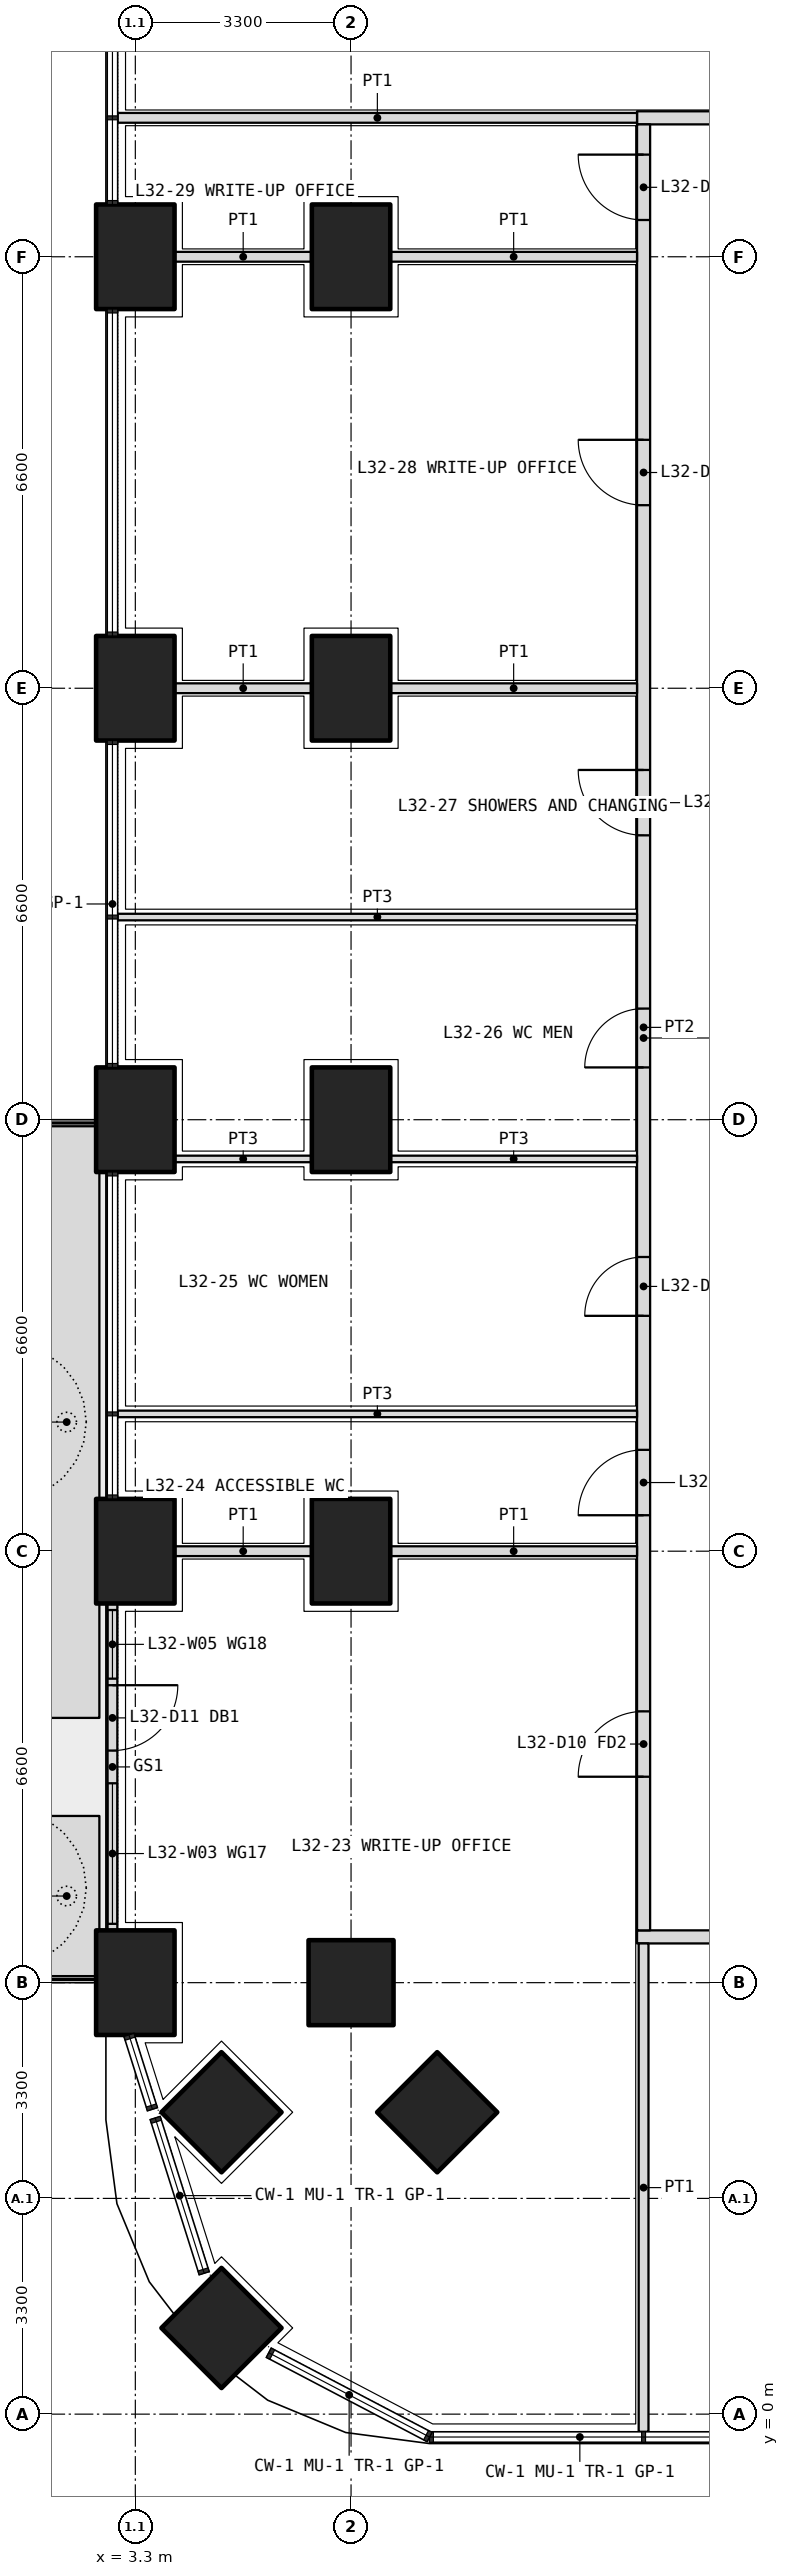
"""IFC4 building model, lengths in metres.
Left out: names, types, materials, properties, quantities, classifications, styles, units other than length and angle.
Written with IfcOpenShell. Run it as: python <this file> out.ifc"""

import sys

from ifc_helpers import new_model, si_unit, direction, frame, frame_2d, origin, origin_2d, place, context, subcontext, project, spatial, polyline, rectangle, outline, extrude, element, fill, save


model = new_model("IFC4")
c1 = context("Model", 3, precision=1e-05, world=origin(), true_north=direction((0.0, 1.0)))
c2 = subcontext(c1, "Body", "Model", "MODEL_VIEW")
j1 = project(units=[si_unit("LENGTHUNIT", "METRE"), si_unit("PLANEANGLEUNIT", "RADIAN")], contexts=[c1])
p1 = place(None, origin())
s1 = spatial("IfcSite", under=j1, at=p1, CompositionType="ELEMENT")
p2 = place(p1, origin())
s2 = spatial("IfcBuilding", under=s1, at=p2, CompositionType="ELEMENT")
p3 = place(p2, frame((0.0, 0.0, 141.0)))
s3 = spatial("IfcBuildingStorey", under=s2, at=p3, CompositionType="ELEMENT", Elevation=141.0)
p4 = place(p3, frame((4.618, 1.318, 0.0), z_axis=(0.0, 0.0, 1.0), x_axis=(0.707106781187, 0.707106781187, 0.0)))
e1 = element("IfcColumn", 1, at=p4, inside=s3, PredefinedType="COLUMN", context=c2, shape_type="SweptSolid", body=[
    extrude(rectangle(XDim=1.3, YDim=1.3, at=origin_2d()), origin(), (0.0, 0.0, 1.0), 4.2),
])
for number, where, z_axis, x_axis in (
    (2, (3.3, 6.6, 0.0), (0.0, 0.0, 1.0), (0.0, 1.0, 0.0)),
    (3, (3.3, 13.2, 0.0), (0.0, 0.0, 1.0), (0.0, 1.0, 0.0)),
    (4, (3.3, 19.8, 0.0), (0.0, 0.0, 1.0), (0.0, 1.0, 0.0)),
    (5, (3.3, 26.4, 0.0), (0.0, 0.0, 1.0), (0.0, 1.0, 0.0)),
    (6, (3.3, 33.0, 0.0), (0.0, 0.0, 1.0), (0.0, 1.0, 0.0)),
):
    element("IfcColumn", number, at=place(p3, frame(where, z_axis=z_axis, x_axis=x_axis)), inside=s3, PredefinedType="COLUMN", context=c2, shape_type="SweptSolid", body=[
        extrude(rectangle(XDim=1.6, YDim=1.2, at=origin_2d()), origin(), (0.0, 0.0, 1.0), 4.2),
    ])
for number, where, z_axis, x_axis in (
    (7, (6.6, 6.6, 0.0), (0.0, 0.0, 1.0), (1.0, 0.0, 0.0)),
    (8, (4.618, 4.618, 0.0), (0.0, 0.0, 1.0), (0.707, 0.707, 0.0)),
    (9, (7.918, 4.618, 0.0), (0.0, 0.0, 1.0), (0.707, 0.707, 0.0)),
):
    element("IfcColumn", number, at=place(p3, frame(where, z_axis=z_axis, x_axis=x_axis)), inside=s3, PredefinedType="COLUMN", context=c2, shape_type="SweptSolid", body=[
        extrude(rectangle(XDim=1.3, YDim=1.3, at=origin_2d()), origin(), (0.0, 0.0, 1.0), 4.2),
    ])
for number, where, z_axis, x_axis in (
    (10, (6.6, 13.2, 0.0), (0.0, 0.0, 1.0), (0.0, 1.0, 0.0)),
    (11, (6.6, 19.8, 0.0), (0.0, 0.0, 1.0), (0.0, 1.0, 0.0)),
    (12, (6.6, 26.4, 0.0), (0.0, 0.0, 1.0), (0.0, 1.0, 0.0)),
    (13, (6.6, 33.0, 0.0), (0.0, 0.0, 1.0), (0.0, 1.0, 0.0)),
):
    element("IfcColumn", number, at=place(p3, frame(where, z_axis=z_axis, x_axis=x_axis)), inside=s3, PredefinedType="COLUMN", context=c2, shape_type="SweptSolid", body=[
        extrude(rectangle(XDim=1.6, YDim=1.2, at=origin_2d()), origin(), (0.0, 0.0, 1.0), 4.2),
    ])
p5 = place(p3, origin())
e14 = element("IfcWall", 14, at=p5, inside=s3, PredefinedType="USERDEFINED", context=c2, shape_type="SweptSolid", body=[
    extrude(outline(polyline([(1.75, 6.7), (2.75, 6.7), (2.75, 9.15), (1.75, 9.15), (1.75, 6.7)]), holes=[polyline([(1.9, 6.85), (2.6, 6.85), (2.6, 9.0), (1.9, 9.0), (1.9, 6.85)])]), origin(), (0.0, 0.0, 1.0), 1.05),
])
p6 = place(p3, origin())
e15 = element("IfcWall", 15, at=p6, inside=s3, PredefinedType="USERDEFINED", context=c2, shape_type="SweptSolid", body=[
    extrude(outline(polyline([(1.75, 10.65), (2.75, 10.65), (2.75, 19.7), (1.75, 19.7), (1.75, 10.65)]), holes=[polyline([(1.9, 10.8), (2.6, 10.8), (2.6, 19.55), (1.9, 19.55), (1.9, 10.8)])]), origin(), (0.0, 0.0, 1.0), 1.05),
])
p7 = place(p3, frame((2.95, 12.4, 0.0), z_axis=(0.0, 0.0, 1.0), x_axis=(0.0, -1.0, 0.0)))
e16 = element("IfcWall", 16, at=p7, inside=s3, PredefinedType="SOLIDWALL", context=c2, shape_type="SweptSolid", body=[
    extrude(rectangle(XDim=5.0, YDim=0.15, at=frame_2d((2.5, 0.0))), origin(), (0.0, 0.0, 1.0), 2.6),
])
p8 = place(p7, frame((1.25, 0.0, 0.0)))
e17 = element("IfcOpeningElement", 17, at=p8, cuts=e16, PredefinedType="OPENING", context=c2, shape_type="SweptSolid", body=[
    extrude(rectangle(XDim=1.0, YDim=2.4, at=frame_2d((0.5, 1.2))), frame((0.0, 0.085, 0.0), z_axis=(0.0, -1.0, 0.0), x_axis=(1.0, 0.0, 0.0)), (0.0, 0.0, 1.0), 0.17),
])
p9 = place(p7, frame((0.1, 0.0, 0.1)))
e18 = element("IfcOpeningElement", 18, at=p9, cuts=e16, PredefinedType="OPENING", context=c2, shape_type="SweptSolid", body=[
    extrude(rectangle(XDim=1.05, YDim=2.2, at=frame_2d((0.525, 1.1))), frame((0.0, 0.085, 0.0), z_axis=(0.0, -1.0, 0.0), x_axis=(1.0, 0.0, 0.0)), (0.0, 0.0, 1.0), 0.17),
])
p10 = place(p7, frame((2.75, 0.0, 0.1)))
e19 = element("IfcOpeningElement", 19, at=p10, cuts=e16, PredefinedType="OPENING", context=c2, shape_type="SweptSolid", body=[
    extrude(rectangle(XDim=2.15, YDim=2.2, at=frame_2d((1.075, 1.1))), frame((0.0, 0.085, 0.0), z_axis=(0.0, -1.0, 0.0), x_axis=(1.0, 0.0, 0.0)), (0.0, 0.0, 1.0), 0.17),
])
p11 = place(p3, frame((10.975, 7.3, 0.0), z_axis=(0.0, 0.0, 1.0), x_axis=(1.0, 0.0, 0.0)))
e20 = element("IfcWall", 20, at=p11, inside=s3, PredefinedType="PARTITIONING", context=c2, shape_type="SweptSolid", body=[
    extrude(rectangle(XDim=30.85, YDim=0.2, at=frame_2d((15.425, 0.0))), origin(), (0.0, 0.0, 1.0), 2.85),
])
p12 = place(p11, frame((3.962, 0.0, 0.0)))
e21 = element("IfcOpeningElement", 21, at=p12, cuts=e20, PredefinedType="OPENING", context=c2, shape_type="SweptSolid", body=[
    extrude(rectangle(XDim=1.0, YDim=2.1, at=frame_2d((0.5, 1.05))), frame((0.0, 0.11, 0.0), z_axis=(0.0, -1.0, 0.0), x_axis=(1.0, 0.0, 0.0)), (0.0, 0.0, 1.0), 0.22),
])
p13 = place(p11, frame((13.275, 0.0, 0.0)))
e22 = element("IfcOpeningElement", 22, at=p13, cuts=e20, PredefinedType="OPENING", context=c2, shape_type="SweptSolid", body=[
    extrude(rectangle(XDim=1.0, YDim=2.1, at=frame_2d((0.5, 1.05))), frame((0.0, 0.11, 0.0), z_axis=(0.0, -1.0, 0.0), x_axis=(1.0, 0.0, 0.0)), (0.0, 0.0, 1.0), 0.22),
])
p14 = place(p11, frame((21.525, 0.0, 0.0)))
e23 = element("IfcOpeningElement", 23, at=p14, cuts=e20, PredefinedType="OPENING", context=c2, shape_type="SweptSolid", body=[
    extrude(rectangle(XDim=1.0, YDim=2.1, at=frame_2d((0.5, 1.05))), frame((0.0, 0.11, 0.0), z_axis=(0.0, -1.0, 0.0), x_axis=(1.0, 0.0, 0.0)), (0.0, 0.0, 1.0), 0.22),
])
p15 = place(p11, frame((27.438, 0.0, 0.0)))
e24 = element("IfcOpeningElement", 24, at=p15, cuts=e20, PredefinedType="OPENING", context=c2, shape_type="SweptSolid", body=[
    extrude(rectangle(XDim=1.2, YDim=2.1, at=frame_2d((0.6, 1.05))), frame((0.0, 0.11, 0.0), z_axis=(0.0, -1.0, 0.0), x_axis=(1.0, 0.0, 0.0)), (0.0, 0.0, 1.0), 0.22),
])
p16 = place(p3, frame((10.975, 35.125, 0.0), z_axis=(0.0, 0.0, 1.0), x_axis=(1.0, 0.0, 0.0)))
e25 = element("IfcWall", 25, at=p16, inside=s3, PredefinedType="PARTITIONING", context=c2, shape_type="SweptSolid", body=[
    extrude(rectangle(XDim=30.85, YDim=0.2, at=frame_2d((15.425, 0.0))), origin(), (0.0, 0.0, 1.0), 2.85),
])
p17 = place(p16, frame((2.312, 0.0, 0.0)))
e26 = element("IfcOpeningElement", 26, at=p17, cuts=e25, PredefinedType="OPENING", context=c2, shape_type="SweptSolid", body=[
    extrude(rectangle(XDim=1.0, YDim=2.1, at=frame_2d((0.5, 1.05))), frame((0.0, 0.11, 0.0), z_axis=(0.0, -1.0, 0.0), x_axis=(1.0, 0.0, 0.0)), (0.0, 0.0, 1.0), 0.22),
])
p18 = place(p16, frame((8.325, 0.0, 0.0)))
e27 = element("IfcOpeningElement", 27, at=p18, cuts=e25, PredefinedType="OPENING", context=c2, shape_type="SweptSolid", body=[
    extrude(rectangle(XDim=1.0, YDim=2.1, at=frame_2d((0.5, 1.05))), frame((0.0, 0.11, 0.0), z_axis=(0.0, -1.0, 0.0), x_axis=(1.0, 0.0, 0.0)), (0.0, 0.0, 1.0), 0.22),
])
p19 = place(p16, frame((13.725, 0.0, 0.0)))
e28 = element("IfcOpeningElement", 28, at=p19, cuts=e25, PredefinedType="OPENING", context=c2, shape_type="SweptSolid", body=[
    extrude(rectangle(XDim=1.0, YDim=2.1, at=frame_2d((0.5, 1.05))), frame((0.0, 0.11, 0.0), z_axis=(0.0, -1.0, 0.0), x_axis=(1.0, 0.0, 0.0)), (0.0, 0.0, 1.0), 0.22),
])
p20 = place(p16, frame((17.025, 0.0, 0.0)))
e29 = element("IfcOpeningElement", 29, at=p20, cuts=e25, PredefinedType="OPENING", context=c2, shape_type="SweptSolid", body=[
    extrude(rectangle(XDim=1.0, YDim=2.1, at=frame_2d((0.5, 1.05))), frame((0.0, 0.11, 0.0), z_axis=(0.0, -1.0, 0.0), x_axis=(1.0, 0.0, 0.0)), (0.0, 0.0, 1.0), 0.22),
])
p21 = place(p16, frame((24.238, 0.0, 0.0)))
e30 = element("IfcOpeningElement", 30, at=p21, cuts=e25, PredefinedType="OPENING", context=c2, shape_type="SweptSolid", body=[
    extrude(rectangle(XDim=1.0, YDim=2.1, at=frame_2d((0.5, 1.05))), frame((0.0, 0.11, 0.0), z_axis=(0.0, -1.0, 0.0), x_axis=(1.0, 0.0, 0.0)), (0.0, 0.0, 1.0), 0.22),
])
p22 = place(p3, frame((11.075, 7.4, 0.0), z_axis=(0.0, 0.0, 1.0), x_axis=(0.0, 1.0, 0.0)))
e31 = element("IfcWall", 31, at=p22, inside=s3, PredefinedType="PARTITIONING", context=c2, shape_type="SweptSolid", body=[
    extrude(rectangle(XDim=27.625, YDim=0.2, at=frame_2d((13.812, 0.0))), origin(), (0.0, 0.0, 1.0), 2.85),
])
p23 = place(p22, frame((2.35, 0.0, 0.0)))
e32 = element("IfcOpeningElement", 32, at=p23, cuts=e31, PredefinedType="OPENING", context=c2, shape_type="SweptSolid", body=[
    extrude(rectangle(XDim=1.0, YDim=2.1, at=frame_2d((0.5, 1.05))), frame((0.0, 0.11, 0.0), z_axis=(0.0, -1.0, 0.0), x_axis=(1.0, 0.0, 0.0)), (0.0, 0.0, 1.0), 0.22),
])
p24 = place(p22, frame((6.35, 0.0, 0.0)))
e33 = element("IfcOpeningElement", 33, at=p24, cuts=e31, PredefinedType="OPENING", context=c2, shape_type="SweptSolid", body=[
    extrude(rectangle(XDim=1.0, YDim=2.1, at=frame_2d((0.5, 1.05))), frame((0.0, 0.11, 0.0), z_axis=(0.0, -1.0, 0.0), x_axis=(1.0, 0.0, 0.0)), (0.0, 0.0, 1.0), 0.22),
])
p25 = place(p22, frame((9.4, 0.0, 0.0)))
e34 = element("IfcOpeningElement", 34, at=p25, cuts=e31, PredefinedType="OPENING", context=c2, shape_type="SweptSolid", body=[
    extrude(rectangle(XDim=0.9, YDim=2.1, at=frame_2d((0.45, 1.05))), frame((0.0, 0.11, 0.0), z_axis=(0.0, -1.0, 0.0), x_axis=(1.0, 0.0, 0.0)), (0.0, 0.0, 1.0), 0.22),
])
p26 = place(p22, frame((13.2, 0.0, 0.0)))
e35 = element("IfcOpeningElement", 35, at=p26, cuts=e31, PredefinedType="OPENING", context=c2, shape_type="SweptSolid", body=[
    extrude(rectangle(XDim=0.9, YDim=2.1, at=frame_2d((0.45, 1.05))), frame((0.0, 0.11, 0.0), z_axis=(0.0, -1.0, 0.0), x_axis=(1.0, 0.0, 0.0)), (0.0, 0.0, 1.0), 0.22),
])
p27 = place(p22, frame((16.75, 0.0, 0.0)))
e36 = element("IfcOpeningElement", 36, at=p27, cuts=e31, PredefinedType="OPENING", context=c2, shape_type="SweptSolid", body=[
    extrude(rectangle(XDim=1.0, YDim=2.1, at=frame_2d((0.5, 1.05))), frame((0.0, 0.11, 0.0), z_axis=(0.0, -1.0, 0.0), x_axis=(1.0, 0.0, 0.0)), (0.0, 0.0, 1.0), 0.22),
])
p28 = place(p22, frame((21.8, 0.0, 0.0)))
e37 = element("IfcOpeningElement", 37, at=p28, cuts=e31, PredefinedType="OPENING", context=c2, shape_type="SweptSolid", body=[
    extrude(rectangle(XDim=1.0, YDim=2.1, at=frame_2d((0.5, 1.05))), frame((0.0, 0.11, 0.0), z_axis=(0.0, -1.0, 0.0), x_axis=(1.0, 0.0, 0.0)), (0.0, 0.0, 1.0), 0.22),
])
p29 = place(p22, frame((26.163, 0.0, 0.0)))
e38 = element("IfcOpeningElement", 38, at=p29, cuts=e31, PredefinedType="OPENING", context=c2, shape_type="SweptSolid", body=[
    extrude(rectangle(XDim=1.0, YDim=2.1, at=frame_2d((0.5, 1.05))), frame((0.0, 0.11, 0.0), z_axis=(0.0, -1.0, 0.0), x_axis=(1.0, 0.0, 0.0)), (0.0, 0.0, 1.0), 0.22),
])
p30 = place(p3, frame((11.075, -0.27, 0.0), z_axis=(0.0, 0.0, 1.0), x_axis=(0.0, 1.0, 0.0)))
e39 = element("IfcWall", 39, at=p30, inside=s3, PredefinedType="PARTITIONING", context=c2, shape_type="SweptSolid", body=[
    extrude(rectangle(XDim=7.47, YDim=0.15, at=frame_2d((3.735, 0.0))), origin(), (0.0, 0.0, 1.0), 2.6),
])
p31 = place(p3, frame((3.03, 35.125, 0.0), z_axis=(0.0, 0.0, 1.0), x_axis=(1.0, 0.0, 0.0)))
e40 = element("IfcWall", 40, at=p31, inside=s3, PredefinedType="PARTITIONING", context=c2, shape_type="SweptSolid", body=[
    extrude(rectangle(XDim=7.945, YDim=0.15, at=frame_2d((3.973, 0.0))), origin(), (0.0, 0.0, 1.0), 2.6),
])
p32 = place(p3, frame((3.03, 15.3, 0.0), z_axis=(0.0, 0.0, 1.0), x_axis=(1.0, 0.0, 0.0)))
e41 = element("IfcWall", 41, at=p32, inside=s3, PredefinedType="PARTITIONING", context=c2, shape_type="SweptSolid", body=[
    extrude(rectangle(XDim=7.945, YDim=0.1, at=frame_2d((3.973, 0.0))), origin(), (0.0, 0.0, 1.0), 2.6),
])
p33 = place(p3, frame((3.9, 19.2, 0.0), z_axis=(0.0, 0.0, 1.0), x_axis=(1.0, 0.0, 0.0)))
e42 = element("IfcWall", 42, at=p33, inside=s3, PredefinedType="PARTITIONING", context=c2, shape_type="SweptSolid", body=[
    extrude(rectangle(XDim=2.1, YDim=0.1, at=frame_2d((1.05, 0.0))), origin(), (0.0, 0.0, 1.0), 2.85),
])
p34 = place(p3, frame((7.2, 19.2, 0.0), z_axis=(0.0, 0.0, 1.0), x_axis=(1.0, 0.0, 0.0)))
e43 = element("IfcWall", 43, at=p34, inside=s3, PredefinedType="PARTITIONING", context=c2, shape_type="SweptSolid", body=[
    extrude(rectangle(XDim=3.775, YDim=0.1, at=frame_2d((1.888, 0.0))), origin(), (0.0, 0.0, 1.0), 2.85),
])
p35 = place(p3, frame((3.03, 22.9, 0.0), z_axis=(0.0, 0.0, 1.0), x_axis=(1.0, 0.0, 0.0)))
e44 = element("IfcWall", 44, at=p35, inside=s3, PredefinedType="PARTITIONING", context=c2, shape_type="SweptSolid", body=[
    extrude(rectangle(XDim=7.945, YDim=0.1, at=frame_2d((3.973, 0.0))), origin(), (0.0, 0.0, 1.0), 2.6),
])
p36 = place(p3, frame((3.9, 13.2, 0.0), z_axis=(0.0, 0.0, 1.0), x_axis=(1.0, 0.0, 0.0)))
e45 = element("IfcWall", 45, at=p36, inside=s3, PredefinedType="PARTITIONING", context=c2, shape_type="SweptSolid", body=[
    extrude(rectangle(XDim=2.1, YDim=0.15, at=frame_2d((1.05, 0.0))), origin(), (0.0, 0.0, 1.0), 2.85),
])
p37 = place(p3, frame((7.2, 13.2, 0.0), z_axis=(0.0, 0.0, 1.0), x_axis=(1.0, 0.0, 0.0)))
e46 = element("IfcWall", 46, at=p37, inside=s3, PredefinedType="PARTITIONING", context=c2, shape_type="SweptSolid", body=[
    extrude(rectangle(XDim=3.775, YDim=0.15, at=frame_2d((1.888, 0.0))), origin(), (0.0, 0.0, 1.0), 2.85),
])
p38 = place(p3, frame((3.9, 26.4, 0.0), z_axis=(0.0, 0.0, 1.0), x_axis=(1.0, 0.0, 0.0)))
e47 = element("IfcWall", 47, at=p38, inside=s3, PredefinedType="PARTITIONING", context=c2, shape_type="SweptSolid", body=[
    extrude(rectangle(XDim=2.1, YDim=0.15, at=frame_2d((1.05, 0.0))), origin(), (0.0, 0.0, 1.0), 2.85),
])
p39 = place(p3, frame((7.2, 26.4, 0.0), z_axis=(0.0, 0.0, 1.0), x_axis=(1.0, 0.0, 0.0)))
e48 = element("IfcWall", 48, at=p39, inside=s3, PredefinedType="PARTITIONING", context=c2, shape_type="SweptSolid", body=[
    extrude(rectangle(XDim=3.775, YDim=0.15, at=frame_2d((1.888, 0.0))), origin(), (0.0, 0.0, 1.0), 2.85),
])
p40 = place(p3, frame((3.9, 33.0, 0.0), z_axis=(0.0, 0.0, 1.0), x_axis=(1.0, 0.0, 0.0)))
e49 = element("IfcWall", 49, at=p40, inside=s3, PredefinedType="PARTITIONING", context=c2, shape_type="SweptSolid", body=[
    extrude(rectangle(XDim=2.1, YDim=0.15, at=frame_2d((1.05, 0.0))), origin(), (0.0, 0.0, 1.0), 2.85),
])
p41 = place(p3, frame((7.2, 33.0, 0.0), z_axis=(0.0, 0.0, 1.0), x_axis=(1.0, 0.0, 0.0)))
e50 = element("IfcWall", 50, at=p41, inside=s3, PredefinedType="PARTITIONING", context=c2, shape_type="SweptSolid", body=[
    extrude(rectangle(XDim=3.775, YDim=0.15, at=frame_2d((1.888, 0.0))), origin(), (0.0, 0.0, 1.0), 2.85),
])
p42 = place(p8, origin())
e51 = element("IfcDoor", 51, at=p42, inside=s3, OperationType="SINGLE_SWING_LEFT", PredefinedType="DOOR", context=c2, shape_type="SweptSolid", body=[
    extrude(rectangle(XDim=1.0, YDim=2.4, at=frame_2d((0.5, 1.2))), frame((0.0, 0.025, 0.0), z_axis=(0.0, -1.0, 0.0), x_axis=(1.0, 0.0, 0.0)), (0.0, 0.0, 1.0), 0.05),
])
fill(e17, e51)
p43 = place(p9, origin())
e52 = element("IfcWindow", 52, at=p43, inside=s3, PartitioningType="SINGLE_PANEL", PredefinedType="WINDOW", context=c2, shape_type="SweptSolid", body=[
    extrude(rectangle(XDim=1.05, YDim=2.2, at=frame_2d((0.525, 1.1))), frame((0.0, 0.03, 0.0), z_axis=(0.0, -1.0, 0.0), x_axis=(1.0, 0.0, 0.0)), (0.0, 0.0, 1.0), 0.06),
])
fill(e18, e52)
p44 = place(p10, origin())
e53 = element("IfcWindow", 53, at=p44, inside=s3, PartitioningType="SINGLE_PANEL", PredefinedType="WINDOW", context=c2, shape_type="SweptSolid", body=[
    extrude(rectangle(XDim=2.15, YDim=2.2, at=frame_2d((1.075, 1.1))), frame((0.0, 0.03, 0.0), z_axis=(0.0, -1.0, 0.0), x_axis=(1.0, 0.0, 0.0)), (0.0, 0.0, 1.0), 0.06),
])
fill(e19, e53)
p45 = place(p23, origin())
e54 = element("IfcDoor", 54, at=p45, inside=s3, OperationType="SINGLE_SWING_LEFT", PredefinedType="DOOR", context=c2, shape_type="SweptSolid", body=[
    extrude(rectangle(XDim=1.0, YDim=2.1, at=frame_2d((0.5, 1.05))), frame((0.0, 0.025, 0.0), z_axis=(0.0, -1.0, 0.0), x_axis=(1.0, 0.0, 0.0)), (0.0, 0.0, 1.0), 0.05),
])
fill(e32, e54)
p46 = place(p24, origin())
e55 = element("IfcDoor", 55, at=p46, inside=s3, OperationType="SINGLE_SWING_LEFT", PredefinedType="DOOR", context=c2, shape_type="SweptSolid", body=[
    extrude(rectangle(XDim=1.0, YDim=2.1, at=frame_2d((0.5, 1.05))), frame((0.0, 0.025, 0.0), z_axis=(0.0, -1.0, 0.0), x_axis=(1.0, 0.0, 0.0)), (0.0, 0.0, 1.0), 0.05),
])
fill(e33, e55)
p47 = place(p25, origin())
e56 = element("IfcDoor", 56, at=p47, inside=s3, OperationType="SINGLE_SWING_LEFT", PredefinedType="DOOR", context=c2, shape_type="SweptSolid", body=[
    extrude(rectangle(XDim=0.9, YDim=2.1, at=frame_2d((0.45, 1.05))), frame((0.0, 0.025, 0.0), z_axis=(0.0, -1.0, 0.0), x_axis=(1.0, 0.0, 0.0)), (0.0, 0.0, 1.0), 0.05),
])
fill(e34, e56)
p48 = place(p26, origin())
e57 = element("IfcDoor", 57, at=p48, inside=s3, OperationType="SINGLE_SWING_LEFT", PredefinedType="DOOR", context=c2, shape_type="SweptSolid", body=[
    extrude(rectangle(XDim=0.9, YDim=2.1, at=frame_2d((0.45, 1.05))), frame((0.0, 0.025, 0.0), z_axis=(0.0, -1.0, 0.0), x_axis=(1.0, 0.0, 0.0)), (0.0, 0.0, 1.0), 0.05),
])
fill(e35, e57)
p49 = place(p27, origin())
e58 = element("IfcDoor", 58, at=p49, inside=s3, OperationType="SINGLE_SWING_RIGHT", PredefinedType="DOOR", context=c2, shape_type="SweptSolid", body=[
    extrude(rectangle(XDim=1.0, YDim=2.1, at=frame_2d((0.5, 1.05))), frame((0.0, 0.025, 0.0), z_axis=(0.0, -1.0, 0.0), x_axis=(1.0, 0.0, 0.0)), (0.0, 0.0, 1.0), 0.05),
])
fill(e36, e58)
p50 = place(p28, origin())
e59 = element("IfcDoor", 59, at=p50, inside=s3, OperationType="SINGLE_SWING_RIGHT", PredefinedType="DOOR", context=c2, shape_type="SweptSolid", body=[
    extrude(rectangle(XDim=1.0, YDim=2.1, at=frame_2d((0.5, 1.05))), frame((0.0, 0.025, 0.0), z_axis=(0.0, -1.0, 0.0), x_axis=(1.0, 0.0, 0.0)), (0.0, 0.0, 1.0), 0.05),
])
fill(e37, e59)
p51 = place(p29, origin())
e60 = element("IfcDoor", 60, at=p51, inside=s3, OperationType="SINGLE_SWING_RIGHT", PredefinedType="DOOR", context=c2, shape_type="SweptSolid", body=[
    extrude(rectangle(XDim=1.0, YDim=2.1, at=frame_2d((0.5, 1.05))), frame((0.0, 0.025, 0.0), z_axis=(0.0, -1.0, 0.0), x_axis=(1.0, 0.0, 0.0)), (0.0, 0.0, 1.0), 0.05),
])
fill(e38, e60)
save(model, sys.argv[1])
